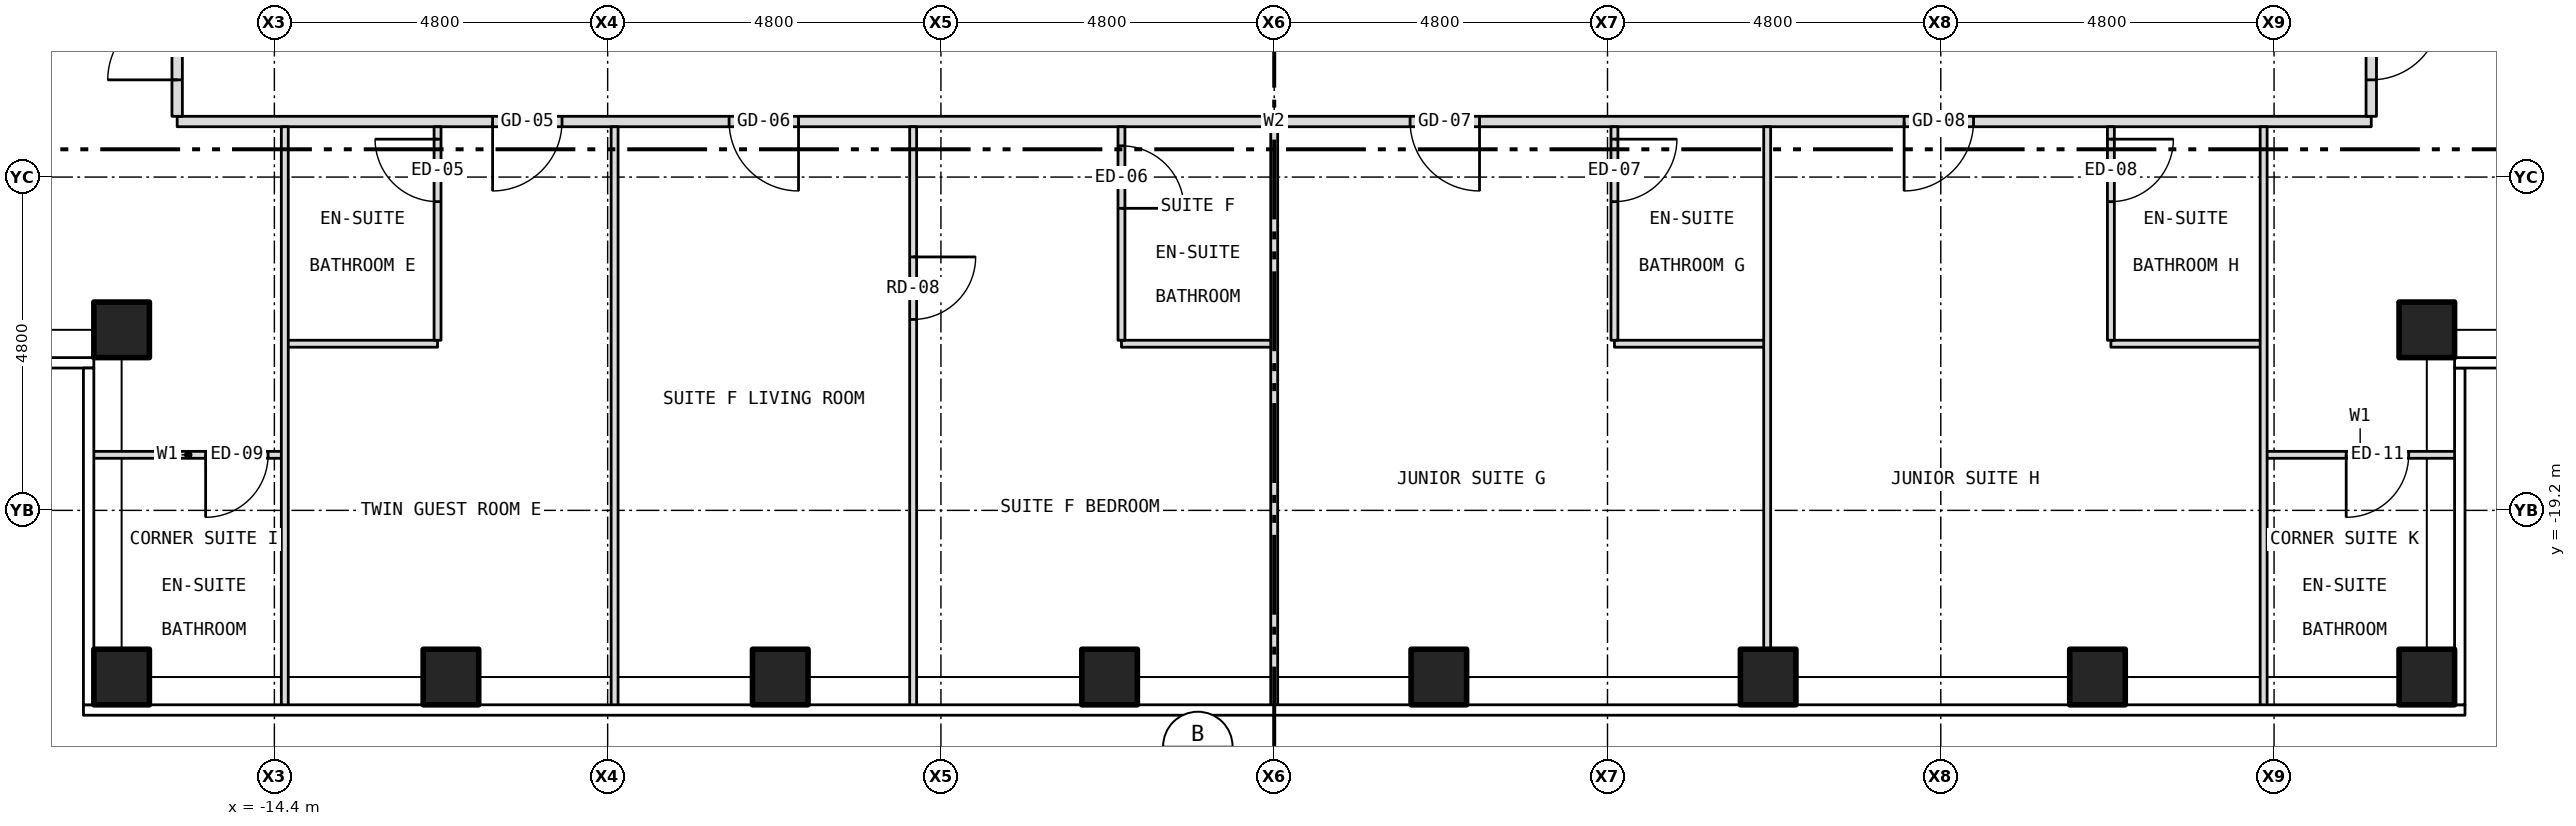
"""IFC4 building model, lengths in metres.
Left out: names, types, materials, properties, quantities, classifications, styles, units other than length and angle.
Written with IfcOpenShell. Run it as: python <this file> out.ifc"""

import sys

from ifc_helpers import new_model, si_unit, direction, frame, frame_2d, origin, origin_2d, place, context, subcontext, project, spatial, rectangle, hollow_rectangle, extrude, element, fill, save


model = new_model("IFC4")
c1 = context("Model", 3, precision=1e-05, world=origin(), true_north=direction((0.0, 1.0)))
c2 = subcontext(c1, "Body", "Model", "MODEL_VIEW")
j1 = project(units=[si_unit("LENGTHUNIT", "METRE"), si_unit("PLANEANGLEUNIT", "RADIAN")], contexts=[c1])
p1 = place(None, origin())
s1 = spatial("IfcSite", under=j1, at=p1, CompositionType="ELEMENT")
p2 = place(p1, origin())
s2 = spatial("IfcBuilding", under=s1, at=p2, CompositionType="ELEMENT")
p3 = place(p2, frame((0.0, 0.0, 176.0)))
s3 = spatial("IfcBuildingStorey", under=s2, at=p3, CompositionType="ELEMENT", Elevation=176.0)
for number, where, z_axis, x_axis in (
    (1, (-16.6, -21.6, -0.15), (0.0, 0.0, 1.0), (1.0, 0.0, 0.0)),
    (2, (-11.857, -21.6, -0.15), (0.0, 0.0, 1.0), (1.0, 0.0, 0.0)),
    (3, (-7.114, -21.6, -0.15), (0.0, 0.0, 1.0), (1.0, 0.0, 0.0)),
    (4, (-2.371, -21.6, -0.15), (0.0, 0.0, 1.0), (1.0, 0.0, 0.0)),
    (5, (2.371, -21.6, -0.15), (0.0, 0.0, 1.0), (1.0, 0.0, 0.0)),
    (6, (7.114, -21.6, -0.15), (0.0, 0.0, 1.0), (1.0, 0.0, 0.0)),
    (7, (11.857, -21.6, -0.15), (0.0, 0.0, 1.0), (1.0, 0.0, 0.0)),
    (8, (16.6, -21.6, -0.15), (0.0, 0.0, 1.0), (1.0, 0.0, 0.0)),
    (9, (-16.6, -16.6, -0.15), (0.0, 0.0, 1.0), (1.0, 0.0, 0.0)),
    (10, (16.6, -16.6, -0.15), (0.0, 0.0, 1.0), (1.0, 0.0, 0.0)),
):
    element("IfcColumn", number, at=place(p3, frame(where, z_axis=z_axis, x_axis=x_axis)), inside=s3, PredefinedType="COLUMN", context=c2, shape_type="SweptSolid", body=[
        extrude(hollow_rectangle(XDim=0.8, YDim=0.8, WallThickness=0.045, at=origin_2d()), origin(), (0.0, 0.0, 1.0), 3.5),
    ])
p4 = place(p3, frame((-17.03, -18.4, 0.0), z_axis=(0.0, 0.0, 1.0), x_axis=(1.0, 0.0, 0.0)))
e11 = element("IfcWall", 11, at=p4, inside=s3, PredefinedType="PARTITIONING", context=c2, shape_type="SweptSolid", body=[
    extrude(rectangle(XDim=2.78, YDim=0.1, at=frame_2d((1.39, 0.0))), origin(), (0.0, 0.0, 1.0), 3.35),
])
p5 = place(p4, frame((1.64, 0.0, 0.0)))
e12 = element("IfcOpeningElement", 12, at=p5, cuts=e11, PredefinedType="OPENING", context=c2, shape_type="SweptSolid", body=[
    extrude(rectangle(XDim=0.9, YDim=2.1, at=frame_2d((0.45, 1.05))), frame((0.0, 0.062, 0.0), z_axis=(0.0, -1.0, 0.0), x_axis=(1.0, 0.0, 0.0)), (0.0, 0.0, 1.0), 0.124),
])
p6 = place(p3, frame((14.25, -18.4, 0.0), z_axis=(0.0, 0.0, 1.0), x_axis=(1.0, 0.0, 0.0)))
e13 = element("IfcWall", 13, at=p6, inside=s3, PredefinedType="PARTITIONING", context=c2, shape_type="SweptSolid", body=[
    extrude(rectangle(XDim=2.78, YDim=0.1, at=frame_2d((1.39, 0.0))), origin(), (0.0, 0.0, 1.0), 3.35),
])
p7 = place(p6, frame((1.189, 0.0, 0.0)))
e14 = element("IfcOpeningElement", 14, at=p7, cuts=e13, PredefinedType="OPENING", context=c2, shape_type="SweptSolid", body=[
    extrude(rectangle(XDim=0.9, YDim=2.1, at=frame_2d((0.45, 1.05))), frame((0.0, 0.062, 0.0), z_axis=(0.0, -1.0, 0.0), x_axis=(1.0, 0.0, 0.0)), (0.0, 0.0, 1.0), 0.124),
])
for number, where, z_axis, x_axis in (
    (15, (-14.25, -16.8, 0.0), (0.0, 0.0, 1.0), (1.0, 0.0, 0.0)),
    (16, (-2.2, -16.8, 0.0), (0.0, 0.0, 1.0), (1.0, 0.0, 0.0)),
):
    element("IfcWall", number, at=place(p3, frame(where, z_axis=z_axis, x_axis=x_axis)), inside=s3, PredefinedType="PARTITIONING", context=c2, shape_type="SweptSolid", body=[
        extrude(rectangle(XDim=2.2, YDim=0.1, at=frame_2d((1.1, 0.0))), origin(), (0.0, 0.0, 1.0), 3.35),
    ])
p8 = place(p3, frame((4.9, -16.8, 0.0), z_axis=(0.0, 0.0, 1.0), x_axis=(1.0, 0.0, 0.0)))
e17 = element("IfcWall", 17, at=p8, inside=s3, PredefinedType="PARTITIONING", context=c2, shape_type="SweptSolid", body=[
    extrude(rectangle(XDim=2.2, YDim=0.1, at=frame_2d((1.1, 0.0))), origin(), (0.0, 0.0, 1.0), 3.35),
])
p9 = place(p3, frame((12.05, -16.8, 0.0), z_axis=(0.0, 0.0, 1.0), x_axis=(1.0, 0.0, 0.0)))
e18 = element("IfcWall", 18, at=p9, inside=s3, PredefinedType="PARTITIONING", context=c2, shape_type="SweptSolid", body=[
    extrude(rectangle(XDim=2.2, YDim=0.1, at=frame_2d((1.1, 0.0))), origin(), (0.0, 0.0, 1.0), 3.35),
])
p10 = place(p3, frame((-15.8, -13.6, 0.0), z_axis=(0.0, 0.0, 1.0), x_axis=(1.0, 0.0, 0.0)))
e19 = element("IfcWall", 19, at=p10, inside=s3, PredefinedType="PARTITIONING", context=c2, shape_type="SweptSolid", body=[
    extrude(rectangle(XDim=31.6, YDim=0.15, at=frame_2d((15.8, 0.0))), origin(), (0.0, 0.0, 1.0), 3.35),
])
p11 = place(p10, frame((4.543, 0.0, 0.0)))
e20 = element("IfcOpeningElement", 20, at=p11, cuts=e19, PredefinedType="OPENING", context=c2, shape_type="SweptSolid", body=[
    extrude(rectangle(XDim=1.0, YDim=2.1, at=frame_2d((0.5, 1.05))), frame((0.0, 0.087, 0.0), z_axis=(0.0, -1.0, 0.0), x_axis=(1.0, 0.0, 0.0)), (0.0, 0.0, 1.0), 0.174),
])
p12 = place(p10, frame((7.949, 0.0, 0.0)))
e21 = element("IfcOpeningElement", 21, at=p12, cuts=e19, PredefinedType="OPENING", context=c2, shape_type="SweptSolid", body=[
    extrude(rectangle(XDim=1.0, YDim=2.1, at=frame_2d((0.5, 1.05))), frame((0.0, 0.087, 0.0), z_axis=(0.0, -1.0, 0.0), x_axis=(1.0, 0.0, 0.0)), (0.0, 0.0, 1.0), 0.174),
])
p13 = place(p10, frame((17.757, 0.0, 0.0)))
e22 = element("IfcOpeningElement", 22, at=p13, cuts=e19, PredefinedType="OPENING", context=c2, shape_type="SweptSolid", body=[
    extrude(rectangle(XDim=1.0, YDim=2.1, at=frame_2d((0.5, 1.05))), frame((0.0, 0.087, 0.0), z_axis=(0.0, -1.0, 0.0), x_axis=(1.0, 0.0, 0.0)), (0.0, 0.0, 1.0), 0.174),
])
p14 = place(p10, frame((24.872, 0.0, 0.0)))
e23 = element("IfcOpeningElement", 23, at=p14, cuts=e19, PredefinedType="OPENING", context=c2, shape_type="SweptSolid", body=[
    extrude(rectangle(XDim=1.0, YDim=2.1, at=frame_2d((0.5, 1.05))), frame((0.0, 0.087, 0.0), z_axis=(0.0, -1.0, 0.0), x_axis=(1.0, 0.0, 0.0)), (0.0, 0.0, 1.0), 0.174),
])
p15 = place(p3, frame((-15.8, -13.525, 0.0), z_axis=(0.0, 0.0, 1.0), x_axis=(0.0, 1.0, 0.0)))
e24 = element("IfcWall", 24, at=p15, inside=s3, PredefinedType="PARTITIONING", context=c2, shape_type="SweptSolid", body=[
    extrude(rectangle(XDim=2.605, YDim=0.15, at=frame_2d((1.302, 0.0))), origin(), (0.0, 0.0, 1.0), 3.35),
])
p16 = place(p15, frame((0.525, 0.0, 0.0)))
e25 = element("IfcOpeningElement", 25, at=p16, cuts=e24, PredefinedType="OPENING", context=c2, shape_type="SweptSolid", body=[
    extrude(rectangle(XDim=1.0, YDim=2.1, at=frame_2d((0.5, 1.05))), frame((0.0, 0.087, 0.0), z_axis=(0.0, -1.0, 0.0), x_axis=(1.0, 0.0, 0.0)), (0.0, 0.0, 1.0), 0.174),
])
p17 = place(p3, frame((-14.25, -22.03, 0.0), z_axis=(0.0, 0.0, 1.0), x_axis=(0.0, 1.0, 0.0)))
e26 = element("IfcWall", 26, at=p17, inside=s3, PredefinedType="PARTITIONING", context=c2, shape_type="SweptSolid", body=[
    extrude(rectangle(XDim=8.355, YDim=0.1, at=frame_2d((4.177, 0.0))), origin(), (0.0, 0.0, 1.0), 2.817),
])
p18 = place(p3, frame((-12.05, -16.75, 0.0), z_axis=(0.0, 0.0, 1.0), x_axis=(0.0, 1.0, 0.0)))
e27 = element("IfcWall", 27, at=p18, inside=s3, PredefinedType="PARTITIONING", context=c2, shape_type="SweptSolid", body=[
    extrude(rectangle(XDim=3.075, YDim=0.1, at=frame_2d((1.538, 0.0))), origin(), (0.0, 0.0, 1.0), 3.35),
])
p19 = place(p18, frame((1.996, 0.0, 0.0)))
e28 = element("IfcOpeningElement", 28, at=p19, cuts=e27, PredefinedType="OPENING", context=c2, shape_type="SweptSolid", body=[
    extrude(rectangle(XDim=0.9, YDim=2.1, at=frame_2d((0.45, 1.05))), frame((0.0, 0.062, 0.0), z_axis=(0.0, -1.0, 0.0), x_axis=(1.0, 0.0, 0.0)), (0.0, 0.0, 1.0), 0.124),
])
p20 = place(p3, frame((-9.5, -22.03, 0.0), z_axis=(0.0, 0.0, 1.0), x_axis=(0.0, 1.0, 0.0)))
e29 = element("IfcWall", 29, at=p20, inside=s3, PredefinedType="PARTITIONING", context=c2, shape_type="SweptSolid", body=[
    extrude(rectangle(XDim=8.355, YDim=0.1, at=frame_2d((4.177, 0.0))), origin(), (0.0, 0.0, 1.0), 2.728),
])
p21 = place(p3, frame((-5.2, -22.03, 0.0), z_axis=(0.0, 0.0, 1.0), x_axis=(0.0, 1.0, 0.0)))
e30 = element("IfcWall", 30, at=p21, inside=s3, PredefinedType="PARTITIONING", context=c2, shape_type="SweptSolid", body=[
    extrude(rectangle(XDim=8.355, YDim=0.1, at=frame_2d((4.177, 0.0))), origin(), (0.0, 0.0, 1.0), 3.35),
])
p22 = place(p21, frame((5.58, 0.0, 0.0)))
e31 = element("IfcOpeningElement", 31, at=p22, cuts=e30, PredefinedType="OPENING", context=c2, shape_type="SweptSolid", body=[
    extrude(rectangle(XDim=0.9, YDim=2.1, at=frame_2d((0.45, 1.05))), frame((0.0, 0.062, 0.0), z_axis=(0.0, -1.0, 0.0), x_axis=(1.0, 0.0, 0.0)), (0.0, 0.0, 1.0), 0.124),
])
p23 = place(p3, frame((-2.2, -16.75, 0.0), z_axis=(0.0, 0.0, 1.0), x_axis=(0.0, 1.0, 0.0)))
e32 = element("IfcWall", 32, at=p23, inside=s3, PredefinedType="PARTITIONING", context=c2, shape_type="SweptSolid", body=[
    extrude(rectangle(XDim=3.075, YDim=0.1, at=frame_2d((1.538, 0.0))), origin(), (0.0, 0.0, 1.0), 3.35),
])
p24 = place(p23, frame((1.9, 0.0, 0.0)))
e33 = element("IfcOpeningElement", 33, at=p24, cuts=e32, PredefinedType="OPENING", context=c2, shape_type="SweptSolid", body=[
    extrude(rectangle(XDim=0.9, YDim=2.1, at=frame_2d((0.45, 1.05))), frame((0.0, 0.062, 0.0), z_axis=(0.0, -1.0, 0.0), x_axis=(1.0, 0.0, 0.0)), (0.0, 0.0, 1.0), 0.124),
])
p25 = place(p3, frame((0.0, -22.03, 0.0), z_axis=(0.0, 0.0, 1.0), x_axis=(0.0, 1.0, 0.0)))
e34 = element("IfcWall", 34, at=p25, inside=s3, PredefinedType="PARTITIONING", context=c2, shape_type="SweptSolid", body=[
    extrude(rectangle(XDim=8.355, YDim=0.1, at=frame_2d((4.177, 0.0))), origin(), (0.0, 0.0, 1.0), 2.728),
])
p26 = place(p3, frame((4.9, -16.75, 0.0), z_axis=(0.0, 0.0, 1.0), x_axis=(0.0, 1.0, 0.0)))
e35 = element("IfcWall", 35, at=p26, inside=s3, PredefinedType="PARTITIONING", context=c2, shape_type="SweptSolid", body=[
    extrude(rectangle(XDim=3.075, YDim=0.1, at=frame_2d((1.538, 0.0))), origin(), (0.0, 0.0, 1.0), 2.817),
])
p27 = place(p26, frame((1.996, 0.0, 0.0)))
e36 = element("IfcOpeningElement", 36, at=p27, cuts=e35, PredefinedType="OPENING", context=c2, shape_type="SweptSolid", body=[
    extrude(rectangle(XDim=0.9, YDim=2.1, at=frame_2d((0.45, 1.05))), frame((0.0, 0.062, 0.0), z_axis=(0.0, -1.0, 0.0), x_axis=(1.0, 0.0, 0.0)), (0.0, 0.0, 1.0), 0.124),
])
p28 = place(p3, frame((7.1, -21.48, 0.0), z_axis=(0.0, 0.0, 1.0), x_axis=(0.0, 1.0, 0.0)))
e37 = element("IfcWall", 37, at=p28, inside=s3, PredefinedType="PARTITIONING", context=c2, shape_type="SweptSolid", body=[
    extrude(rectangle(XDim=7.805, YDim=0.1, at=frame_2d((3.902, 0.0))), origin(), (0.0, 0.0, 1.0), 3.35),
])
p29 = place(p3, frame((12.05, -16.75, 0.0), z_axis=(0.0, 0.0, 1.0), x_axis=(0.0, 1.0, 0.0)))
e38 = element("IfcWall", 38, at=p29, inside=s3, PredefinedType="PARTITIONING", context=c2, shape_type="SweptSolid", body=[
    extrude(rectangle(XDim=3.075, YDim=0.1, at=frame_2d((1.538, 0.0))), origin(), (0.0, 0.0, 1.0), 3.35),
])
p30 = place(p29, frame((1.996, 0.0, 0.0)))
e39 = element("IfcOpeningElement", 39, at=p30, cuts=e38, PredefinedType="OPENING", context=c2, shape_type="SweptSolid", body=[
    extrude(rectangle(XDim=0.9, YDim=2.1, at=frame_2d((0.45, 1.05))), frame((0.0, 0.062, 0.0), z_axis=(0.0, -1.0, 0.0), x_axis=(1.0, 0.0, 0.0)), (0.0, 0.0, 1.0), 0.124),
])
p31 = place(p3, frame((14.25, -22.03, 0.0), z_axis=(0.0, 0.0, 1.0), x_axis=(0.0, 1.0, 0.0)))
e40 = element("IfcWall", 40, at=p31, inside=s3, PredefinedType="PARTITIONING", context=c2, shape_type="SweptSolid", body=[
    extrude(rectangle(XDim=8.355, YDim=0.1, at=frame_2d((4.177, 0.0))), origin(), (0.0, 0.0, 1.0), 2.817),
])
p32 = place(p3, frame((15.8, -13.525, 0.0), z_axis=(0.0, 0.0, 1.0), x_axis=(0.0, 1.0, 0.0)))
e41 = element("IfcWall", 41, at=p32, inside=s3, PredefinedType="PARTITIONING", context=c2, shape_type="SweptSolid", body=[
    extrude(rectangle(XDim=2.605, YDim=0.15, at=frame_2d((1.302, 0.0))), origin(), (0.0, 0.0, 1.0), 3.35),
])
p33 = place(p32, frame((0.525, 0.0, 0.0)))
e42 = element("IfcOpeningElement", 42, at=p33, cuts=e41, PredefinedType="OPENING", context=c2, shape_type="SweptSolid", body=[
    extrude(rectangle(XDim=1.0, YDim=2.1, at=frame_2d((0.5, 1.05))), frame((0.0, 0.087, 0.0), z_axis=(0.0, -1.0, 0.0), x_axis=(1.0, 0.0, 0.0)), (0.0, 0.0, 1.0), 0.174),
])
p34 = place(p11, origin())
e43 = element("IfcDoor", 43, at=p34, inside=s3, OperationType="SINGLE_SWING_LEFT", PredefinedType="DOOR", context=c2, shape_type="SweptSolid", body=[
    extrude(rectangle(XDim=1.0, YDim=2.1, at=frame_2d((0.5, 1.05))), frame((0.0, 0.025, 0.0), z_axis=(0.0, -1.0, 0.0), x_axis=(1.0, 0.0, 0.0)), (0.0, 0.0, 1.0), 0.05),
])
fill(e20, e43)
p35 = place(p19, origin())
e44 = element("IfcDoor", 44, at=p35, inside=s3, OperationType="SINGLE_SWING_RIGHT", PredefinedType="DOOR", context=c2, shape_type="SweptSolid", body=[
    extrude(rectangle(XDim=0.9, YDim=2.1, at=frame_2d((0.45, 1.05))), frame((0.0, 0.025, 0.0), z_axis=(0.0, -1.0, 0.0), x_axis=(1.0, 0.0, 0.0)), (0.0, 0.0, 1.0), 0.05),
])
fill(e28, e44)
p36 = place(p12, origin())
e45 = element("IfcDoor", 45, at=p36, inside=s3, OperationType="SINGLE_SWING_RIGHT", PredefinedType="DOOR", context=c2, shape_type="SweptSolid", body=[
    extrude(rectangle(XDim=1.0, YDim=2.1, at=frame_2d((0.5, 1.05))), frame((0.0, 0.025, 0.0), z_axis=(0.0, -1.0, 0.0), x_axis=(1.0, 0.0, 0.0)), (0.0, 0.0, 1.0), 0.05),
])
fill(e21, e45)
p37 = place(p22, origin())
e46 = element("IfcDoor", 46, at=p37, inside=s3, OperationType="SINGLE_SWING_RIGHT", PredefinedType="DOOR", context=c2, shape_type="SweptSolid", body=[
    extrude(rectangle(XDim=0.9, YDim=2.1, at=frame_2d((0.45, 1.05))), frame((0.0, 0.025, 0.0), z_axis=(0.0, -1.0, 0.0), x_axis=(1.0, 0.0, 0.0)), (0.0, 0.0, 1.0), 0.05),
])
fill(e31, e46)
p38 = place(p24, origin())
e47 = element("IfcDoor", 47, at=p38, inside=s3, OperationType="SINGLE_SWING_LEFT", PredefinedType="DOOR", context=c2, shape_type="SweptSolid", body=[
    extrude(rectangle(XDim=0.9, YDim=2.1, at=frame_2d((0.45, 1.05))), frame((0.0, 0.025, 0.0), z_axis=(0.0, -1.0, 0.0), x_axis=(1.0, 0.0, 0.0)), (0.0, 0.0, 1.0), 0.05),
])
fill(e33, e47)
p39 = place(p13, origin())
e48 = element("IfcDoor", 48, at=p39, inside=s3, OperationType="SINGLE_SWING_RIGHT", PredefinedType="DOOR", context=c2, shape_type="SweptSolid", body=[
    extrude(rectangle(XDim=1.0, YDim=2.1, at=frame_2d((0.5, 1.05))), frame((0.0, 0.025, 0.0), z_axis=(0.0, -1.0, 0.0), x_axis=(1.0, 0.0, 0.0)), (0.0, 0.0, 1.0), 0.05),
])
fill(e22, e48)
p40 = place(p27, origin())
e49 = element("IfcDoor", 49, at=p40, inside=s3, OperationType="SINGLE_SWING_RIGHT", PredefinedType="DOOR", context=c2, shape_type="SweptSolid", body=[
    extrude(rectangle(XDim=0.9, YDim=2.1, at=frame_2d((0.45, 1.05))), frame((0.0, 0.025, 0.0), z_axis=(0.0, -1.0, 0.0), x_axis=(1.0, 0.0, 0.0)), (0.0, 0.0, 1.0), 0.05),
])
fill(e36, e49)
p41 = place(p14, origin())
e50 = element("IfcDoor", 50, at=p41, inside=s3, OperationType="SINGLE_SWING_LEFT", PredefinedType="DOOR", context=c2, shape_type="SweptSolid", body=[
    extrude(rectangle(XDim=1.0, YDim=2.1, at=frame_2d((0.5, 1.05))), frame((0.0, 0.025, 0.0), z_axis=(0.0, -1.0, 0.0), x_axis=(1.0, 0.0, 0.0)), (0.0, 0.0, 1.0), 0.05),
])
fill(e23, e50)
p42 = place(p30, origin())
e51 = element("IfcDoor", 51, at=p42, inside=s3, OperationType="SINGLE_SWING_RIGHT", PredefinedType="DOOR", context=c2, shape_type="SweptSolid", body=[
    extrude(rectangle(XDim=0.9, YDim=2.1, at=frame_2d((0.45, 1.05))), frame((0.0, 0.025, 0.0), z_axis=(0.0, -1.0, 0.0), x_axis=(1.0, 0.0, 0.0)), (0.0, 0.0, 1.0), 0.05),
])
fill(e39, e51)
p43 = place(p5, origin())
e52 = element("IfcDoor", 52, at=p43, inside=s3, OperationType="SINGLE_SWING_LEFT", PredefinedType="DOOR", context=c2, shape_type="SweptSolid", body=[
    extrude(rectangle(XDim=0.9, YDim=2.1, at=frame_2d((0.45, 1.05))), frame((0.0, 0.025, 0.0), z_axis=(0.0, -1.0, 0.0), x_axis=(1.0, 0.0, 0.0)), (0.0, 0.0, 1.0), 0.05),
])
fill(e12, e52)
p44 = place(p16, origin())
e53 = element("IfcDoor", 53, at=p44, inside=s3, OperationType="SINGLE_SWING_LEFT", PredefinedType="DOOR", context=c2, shape_type="SweptSolid", body=[
    extrude(rectangle(XDim=1.0, YDim=2.1, at=frame_2d((0.5, 1.05))), frame((0.0, 0.025, 0.0), z_axis=(0.0, -1.0, 0.0), x_axis=(1.0, 0.0, 0.0)), (0.0, 0.0, 1.0), 0.05),
])
fill(e25, e53)
p45 = place(p7, origin())
e54 = element("IfcDoor", 54, at=p45, inside=s3, OperationType="SINGLE_SWING_LEFT", PredefinedType="DOOR", context=c2, shape_type="SweptSolid", body=[
    extrude(rectangle(XDim=0.9, YDim=2.1, at=frame_2d((0.45, 1.05))), frame((0.0, 0.025, 0.0), z_axis=(0.0, -1.0, 0.0), x_axis=(1.0, 0.0, 0.0)), (0.0, 0.0, 1.0), 0.05),
])
fill(e14, e54)
p46 = place(p33, origin())
e55 = element("IfcDoor", 55, at=p46, inside=s3, OperationType="SINGLE_SWING_RIGHT", PredefinedType="DOOR", context=c2, shape_type="SweptSolid", body=[
    extrude(rectangle(XDim=1.0, YDim=2.1, at=frame_2d((0.5, 1.05))), frame((0.0, 0.025, 0.0), z_axis=(0.0, -1.0, 0.0), x_axis=(1.0, 0.0, 0.0)), (0.0, 0.0, 1.0), 0.05),
])
fill(e42, e55)
save(model, sys.argv[1])
